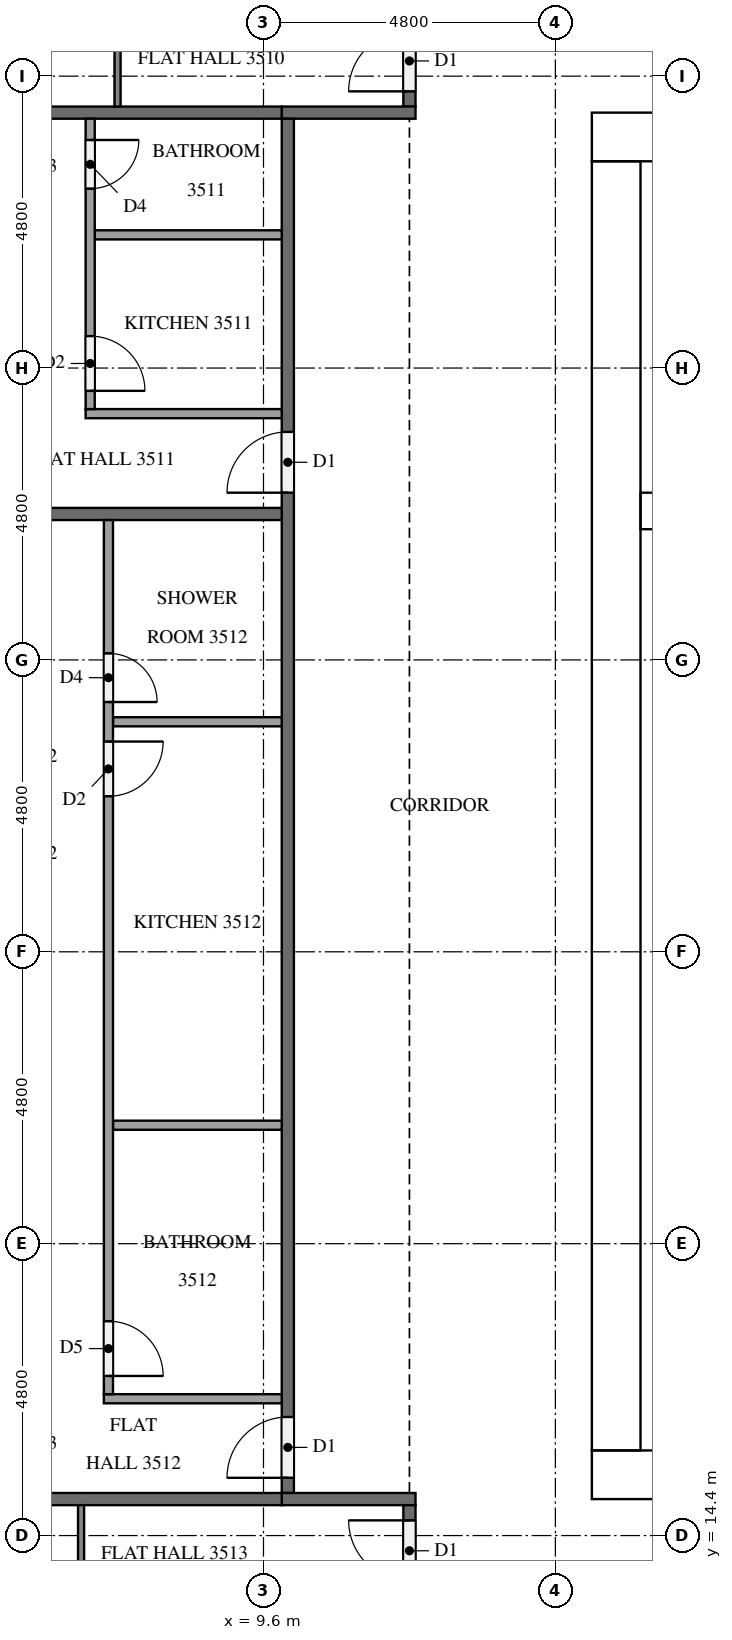
"""IFC4 building model, lengths in metres.
Left out: names, types, materials, properties, quantities, classifications, styles, units other than length and angle.
Written with IfcOpenShell. Run it as: python <this file> out.ifc"""

import sys

from ifc_helpers import new_model, si_unit, direction, frame, frame_2d, origin, place, context, subcontext, project, spatial, rectangle, extrude, element, fill, save


model = new_model("IFC4")
c1 = context("Model", 3, precision=1e-05, world=origin(), true_north=direction((0.0, 1.0)))
c2 = subcontext(c1, "Body", "Model", "MODEL_VIEW")
j1 = project(units=[si_unit("LENGTHUNIT", "METRE"), si_unit("PLANEANGLEUNIT", "RADIAN")], contexts=[c1])
p1 = place(None, origin())
s1 = spatial("IfcSite", under=j1, at=p1, CompositionType="ELEMENT")
p2 = place(p1, origin())
s2 = spatial("IfcBuilding", under=s1, at=p2, CompositionType="ELEMENT")
p3 = place(p2, frame((0.0, 0.0, 136.6)))
s3 = spatial("IfcBuildingStorey", under=s2, at=p3, CompositionType="ELEMENT", Elevation=136.6)
p4 = place(p3, frame((15.0, 15.4, 0.0), z_axis=(0.0, 0.0, 1.0), x_axis=(1.0, 0.0, 0.0)))
e1 = element("IfcWall", 1, at=p4, inside=s3, PredefinedType="SHEAR", context=c2, shape_type="SweptSolid", body=[
    extrude(rectangle(XDim=32.4, YDim=0.8, at=frame_2d((16.2, 0.0))), origin(), (0.0, 0.0, 1.0), 3.2),
])
p5 = place(p4, frame((15.3, 0.0, 0.0)))
e2 = element("IfcOpeningElement", 2, at=p5, cuts=e1, PredefinedType="OPENING", context=c2, shape_type="SweptSolid", body=[
    extrude(rectangle(XDim=1.8, YDim=2.1, at=frame_2d((0.9, 1.05))), frame((0.0, 0.41, 0.0), z_axis=(0.0, -1.0, 0.0), x_axis=(1.0, 0.0, 0.0)), (0.0, 0.0, 1.0), 0.82),
])
p6 = place(p3, frame((15.0, 37.4, 0.0), z_axis=(0.0, 0.0, 1.0), x_axis=(1.0, 0.0, 0.0)))
e3 = element("IfcWall", 3, at=p6, inside=s3, PredefinedType="SHEAR", context=c2, shape_type="SweptSolid", body=[
    extrude(rectangle(XDim=32.4, YDim=0.8, at=frame_2d((16.2, 0.0))), origin(), (0.0, 0.0, 1.0), 3.2),
])
p7 = place(p6, frame((15.3, 0.0, 0.0)))
e4 = element("IfcOpeningElement", 4, at=p7, cuts=e3, PredefinedType="OPENING", context=c2, shape_type="SweptSolid", body=[
    extrude(rectangle(XDim=1.8, YDim=2.1, at=frame_2d((0.9, 1.05))), frame((0.0, 0.41, 0.0), z_axis=(0.0, -1.0, 0.0), x_axis=(1.0, 0.0, 0.0)), (0.0, 0.0, 1.0), 0.82),
])
p8 = place(p6, frame((1.51, 0.0, 0.0)))
e5 = element("IfcOpeningElement", 5, at=p8, cuts=e3, PredefinedType="OPENING", context=c2, shape_type="SweptSolid", body=[
    extrude(rectangle(XDim=1.0, YDim=2.1, at=frame_2d((0.5, 1.05))), frame((0.0, 0.41, 0.0), z_axis=(0.0, -1.0, 0.0), x_axis=(1.0, 0.0, 0.0)), (0.0, 0.0, 1.0), 0.82),
])
p9 = place(p6, frame((5.11, 0.0, 0.0)))
e6 = element("IfcOpeningElement", 6, at=p9, cuts=e3, PredefinedType="OPENING", context=c2, shape_type="SweptSolid", body=[
    extrude(rectangle(XDim=1.0, YDim=2.1, at=frame_2d((0.5, 1.05))), frame((0.0, 0.41, 0.0), z_axis=(0.0, -1.0, 0.0), x_axis=(1.0, 0.0, 0.0)), (0.0, 0.0, 1.0), 0.82),
])
p10 = place(p3, frame((15.4, 15.8, 0.0), z_axis=(0.0, 0.0, 1.0), x_axis=(0.0, 1.0, 0.0)))
e7 = element("IfcWall", 7, at=p10, inside=s3, PredefinedType="SHEAR", context=c2, shape_type="SweptSolid", body=[
    extrude(rectangle(XDim=21.2, YDim=0.8, at=frame_2d((10.6, 0.0))), origin(), (0.0, 0.0, 1.0), 3.2),
])
p11 = place(p10, frame((4.96, 0.0, 0.0)))
e8 = element("IfcOpeningElement", 8, at=p11, cuts=e7, PredefinedType="OPENING", context=c2, shape_type="SweptSolid", body=[
    extrude(rectangle(XDim=1.2, YDim=2.1, at=frame_2d((0.6, 1.05))), frame((0.0, 0.41, 0.0), z_axis=(0.0, -1.0, 0.0), x_axis=(1.0, 0.0, 0.0)), (0.0, 0.0, 1.0), 0.82),
])
p12 = place(p3, frame((15.8, 31.25, 0.0), z_axis=(0.0, 0.0, 1.0), x_axis=(1.0, 0.0, 0.0)))
e9 = element("IfcWall", 9, at=p12, inside=s3, PredefinedType="SHEAR", context=c2, shape_type="SweptSolid", body=[
    extrude(rectangle(XDim=7.0, YDim=0.6, at=frame_2d((3.5, 0.0))), origin(), (0.0, 0.0, 1.0), 3.2),
])
p13 = place(p3, frame((12.0, 37.9, 0.0), z_axis=(0.0, 0.0, 1.0), x_axis=(0.0, 1.0, 0.0)))
e10 = element("IfcWall", 10, at=p13, inside=s3, PredefinedType="PARTITIONING", context=c2, shape_type="SweptSolid", body=[
    extrude(rectangle(XDim=2.8, YDim=0.2, at=frame_2d((1.4, 0.0))), origin(), (0.0, 0.0, 1.0), 3.2),
])
p14 = place(p13, frame((0.25, 0.0, 0.0)))
e11 = element("IfcOpeningElement", 11, at=p14, cuts=e10, PredefinedType="OPENING", context=c2, shape_type="SweptSolid", body=[
    extrude(rectangle(XDim=1.0, YDim=2.1, at=frame_2d((0.5, 1.05))), frame((0.0, 0.11, 0.0), z_axis=(0.0, -1.0, 0.0), x_axis=(1.0, 0.0, 0.0)), (0.0, 0.0, 1.0), 0.22),
])
p15 = place(p3, frame((12.1, 37.8, 0.0), z_axis=(0.0, 0.0, 1.0), x_axis=(-1.0, 0.0, 0.0)))
e12 = element("IfcWall", 12, at=p15, inside=s3, PredefinedType="PARTITIONING", context=c2, shape_type="SweptSolid", body=[
    extrude(rectangle(XDim=2.2, YDim=0.2, at=frame_2d((1.1, 0.0))), origin(), (0.0, 0.0, 1.0), 3.2),
])
p16 = place(p3, frame((10.0, 15.1, 0.0), z_axis=(0.0, 0.0, 1.0), x_axis=(0.0, 1.0, 0.0)))
e13 = element("IfcWall", 13, at=p16, inside=s3, PredefinedType="PARTITIONING", context=c2, shape_type="SweptSolid", body=[
    extrude(rectangle(XDim=22.6, YDim=0.2, at=frame_2d((11.3, 0.0))), origin(), (0.0, 0.0, 1.0), 3.2),
])
p17 = place(p16, frame((16.45, 0.0, 0.0)))
e14 = element("IfcOpeningElement", 14, at=p17, cuts=e13, PredefinedType="OPENING", context=c2, shape_type="SweptSolid", body=[
    extrude(rectangle(XDim=1.0, YDim=2.1, at=frame_2d((0.5, 1.05))), frame((0.0, 0.11, 0.0), z_axis=(0.0, -1.0, 0.0), x_axis=(1.0, 0.0, 0.0)), (0.0, 0.0, 1.0), 0.22),
])
p18 = place(p16, frame((0.25, 0.0, 0.0)))
e15 = element("IfcOpeningElement", 15, at=p18, cuts=e13, PredefinedType="OPENING", context=c2, shape_type="SweptSolid", body=[
    extrude(rectangle(XDim=1.0, YDim=2.1, at=frame_2d((0.5, 1.05))), frame((0.0, 0.11, 0.0), z_axis=(0.0, -1.0, 0.0), x_axis=(1.0, 0.0, 0.0)), (0.0, 0.0, 1.0), 0.22),
])
p19 = place(p3, frame((9.9, 15.0, 0.0), z_axis=(0.0, 0.0, 1.0), x_axis=(1.0, 0.0, 0.0)))
e16 = element("IfcWall", 16, at=p19, inside=s3, PredefinedType="PARTITIONING", context=c2, shape_type="SweptSolid", body=[
    extrude(rectangle(XDim=2.2, YDim=0.2, at=frame_2d((1.1, 0.0))), origin(), (0.0, 0.0, 1.0), 3.2),
])
p20 = place(p3, frame((12.0, 12.1, 0.0), z_axis=(0.0, 0.0, 1.0), x_axis=(0.0, 1.0, 0.0)))
e17 = element("IfcWall", 17, at=p20, inside=s3, PredefinedType="PARTITIONING", context=c2, shape_type="SweptSolid", body=[
    extrude(rectangle(XDim=2.8, YDim=0.2, at=frame_2d((1.4, 0.0))), origin(), (0.0, 0.0, 1.0), 3.2),
])
p21 = place(p20, frame((1.55, 0.0, 0.0)))
e18 = element("IfcOpeningElement", 18, at=p21, cuts=e17, PredefinedType="OPENING", context=c2, shape_type="SweptSolid", body=[
    extrude(rectangle(XDim=1.0, YDim=2.1, at=frame_2d((0.5, 1.05))), frame((0.0, 0.11, 0.0), z_axis=(0.0, -1.0, 0.0), x_axis=(1.0, 0.0, 0.0)), (0.0, 0.0, 1.0), 0.22),
])
p22 = place(p3, frame((0.375, 37.8, 0.0), z_axis=(0.0, 0.0, 1.0), x_axis=(1.0, 0.0, 0.0)))
e19 = element("IfcWall", 19, at=p22, inside=s3, PredefinedType="PARTITIONING", context=c2, shape_type="SweptSolid", body=[
    extrude(rectangle(XDim=9.525, YDim=0.2, at=frame_2d((4.762, 0.0))), origin(), (0.0, 0.0, 1.0), 3.2),
])
for number, where, z_axis, x_axis in (
    (20, (0.1, 31.2, 0.0), (0.0, 0.0, 1.0), (1.0, 0.0, 0.0)),
    (21, (0.1, 15.0, 0.0), (0.0, 0.0, 1.0), (1.0, 0.0, 0.0)),
):
    element("IfcWall", number, at=place(p3, frame(where, z_axis=z_axis, x_axis=x_axis)), inside=s3, PredefinedType="PARTITIONING", context=c2, shape_type="SweptSolid", body=[
        extrude(rectangle(XDim=9.8, YDim=0.2, at=frame_2d((4.9, 0.0))), origin(), (0.0, 0.0, 1.0), 3.2),
    ])
p23 = place(p3, frame((7.2, 37.9, 0.0), z_axis=(0.0, 0.0, 1.0), x_axis=(0.0, 1.0, 0.0)))
e22 = element("IfcWall", 22, at=p23, inside=s3, PredefinedType="PARTITIONING", context=c2, shape_type="SweptSolid", body=[
    extrude(rectangle(XDim=14.8, YDim=0.1, at=frame_2d((7.4, 0.0))), origin(), (0.0, 0.0, 1.0), 3.2),
])
p24 = place(p23, frame((4.05, 0.0, 0.0)))
e23 = element("IfcOpeningElement", 23, at=p24, cuts=e22, PredefinedType="OPENING", context=c2, shape_type="SweptSolid", body=[
    extrude(rectangle(XDim=0.9, YDim=2.1, at=frame_2d((0.45, 1.05))), frame((0.0, 0.06, 0.0), z_axis=(0.0, -1.0, 0.0), x_axis=(1.0, 0.0, 0.0)), (0.0, 0.0, 1.0), 0.12),
])
p25 = place(p23, frame((5.65, 0.0, 0.0)))
e24 = element("IfcOpeningElement", 24, at=p25, cuts=e22, PredefinedType="OPENING", context=c2, shape_type="SweptSolid", body=[
    extrude(rectangle(XDim=0.9, YDim=2.1, at=frame_2d((0.45, 1.05))), frame((0.0, 0.06, 0.0), z_axis=(0.0, -1.0, 0.0), x_axis=(1.0, 0.0, 0.0)), (0.0, 0.0, 1.0), 0.12),
])
p26 = place(p23, frame((13.5, 0.0, 0.0)))
e25 = element("IfcOpeningElement", 25, at=p26, cuts=e22, PredefinedType="OPENING", context=c2, shape_type="SweptSolid", body=[
    extrude(rectangle(XDim=1.0, YDim=2.1, at=frame_2d((0.5, 1.05))), frame((0.0, 0.06, 0.0), z_axis=(0.0, -1.0, 0.0), x_axis=(1.0, 0.0, 0.0)), (0.0, 0.0, 1.0), 0.12),
])
p27 = place(p3, frame((9.9, 35.79, 0.0), z_axis=(0.0, 0.0, 1.0), x_axis=(-1.0, 0.0, 0.0)))
e26 = element("IfcWall", 26, at=p27, inside=s3, PredefinedType="PARTITIONING", context=c2, shape_type="SweptSolid", body=[
    extrude(rectangle(XDim=3.075, YDim=0.15, at=frame_2d((1.538, 0.0))), origin(), (0.0, 0.0, 1.0), 3.2),
])
p28 = place(p3, frame((9.9, 32.85, 0.0), z_axis=(0.0, 0.0, 1.0), x_axis=(-1.0, 0.0, 0.0)))
e27 = element("IfcWall", 27, at=p28, inside=s3, PredefinedType="PARTITIONING", context=c2, shape_type="SweptSolid", body=[
    extrude(rectangle(XDim=3.225, YDim=0.15, at=frame_2d((1.612, 0.0))), origin(), (0.0, 0.0, 1.0), 3.2),
])
p29 = place(p3, frame((6.75, 37.7, 0.0), z_axis=(0.0, 0.0, 1.0), x_axis=(0.0, -1.0, 0.0)))
e28 = element("IfcWall", 28, at=p29, inside=s3, PredefinedType="PARTITIONING", context=c2, shape_type="SweptSolid", body=[
    extrude(rectangle(XDim=4.775, YDim=0.15, at=frame_2d((2.387, 0.0))), origin(), (0.0, 0.0, 1.0), 3.2),
])
p30 = place(p29, frame((3.575, 0.0, 0.0)))
e29 = element("IfcOpeningElement", 29, at=p30, cuts=e28, PredefinedType="OPENING", context=c2, shape_type="SweptSolid", body=[
    extrude(rectangle(XDim=0.9, YDim=2.1, at=frame_2d((0.45, 1.05))), frame((0.0, 0.085, 0.0), z_axis=(0.0, -1.0, 0.0), x_axis=(1.0, 0.0, 0.0)), (0.0, 0.0, 1.0), 0.17),
])
p31 = place(p29, frame((0.35, 0.0, 0.0)))
e30 = element("IfcOpeningElement", 30, at=p31, cuts=e28, PredefinedType="OPENING", context=c2, shape_type="SweptSolid", body=[
    extrude(rectangle(XDim=0.8, YDim=2.1, at=frame_2d((0.4, 1.05))), frame((0.0, 0.085, 0.0), z_axis=(0.0, -1.0, 0.0), x_axis=(1.0, 0.0, 0.0)), (0.0, 0.0, 1.0), 0.17),
])
for number, where, z_axis, x_axis in (
    (31, (9.9, 21.148, 0.0), (0.0, 0.0, 1.0), (-1.0, 0.0, 0.0)),
    (32, (9.9, 27.783, 0.0), (0.0, 0.0, 1.0), (-1.0, 0.0, 0.0)),
):
    element("IfcWall", number, at=place(p3, frame(where, z_axis=z_axis, x_axis=x_axis)), inside=s3, PredefinedType="PARTITIONING", context=c2, shape_type="SweptSolid", body=[
        extrude(rectangle(XDim=2.775, YDim=0.15, at=frame_2d((1.387, 0.0))), origin(), (0.0, 0.0, 1.0), 3.2),
    ])
p32 = place(p3, frame((9.9, 16.65, 0.0), z_axis=(0.0, 0.0, 1.0), x_axis=(-1.0, 0.0, 0.0)))
e33 = element("IfcWall", 33, at=p32, inside=s3, PredefinedType="PARTITIONING", context=c2, shape_type="SweptSolid", body=[
    extrude(rectangle(XDim=2.925, YDim=0.15, at=frame_2d((1.462, 0.0))), origin(), (0.0, 0.0, 1.0), 3.2),
])
p33 = place(p3, frame((7.05, 31.1, 0.0), z_axis=(0.0, 0.0, 1.0), x_axis=(0.0, -1.0, 0.0)))
e34 = element("IfcWall", 34, at=p33, inside=s3, PredefinedType="PARTITIONING", context=c2, shape_type="SweptSolid", body=[
    extrude(rectangle(XDim=14.375, YDim=0.15, at=frame_2d((7.188, 0.0))), origin(), (0.0, 0.0, 1.0), 3.2),
])
p34 = place(p33, frame((13.175, 0.0, 0.0)))
e35 = element("IfcOpeningElement", 35, at=p34, cuts=e34, PredefinedType="OPENING", context=c2, shape_type="SweptSolid", body=[
    extrude(rectangle(XDim=0.9, YDim=2.1, at=frame_2d((0.45, 1.05))), frame((0.0, 0.085, 0.0), z_axis=(0.0, -1.0, 0.0), x_axis=(1.0, 0.0, 0.0)), (0.0, 0.0, 1.0), 0.17),
])
p35 = place(p33, frame((3.642, 0.0, 0.0)))
e36 = element("IfcOpeningElement", 36, at=p35, cuts=e34, PredefinedType="OPENING", context=c2, shape_type="SweptSolid", body=[
    extrude(rectangle(XDim=0.9, YDim=2.1, at=frame_2d((0.45, 1.05))), frame((0.0, 0.085, 0.0), z_axis=(0.0, -1.0, 0.0), x_axis=(1.0, 0.0, 0.0)), (0.0, 0.0, 1.0), 0.17),
])
p36 = place(p33, frame((2.192, 0.0, 0.0)))
e37 = element("IfcOpeningElement", 37, at=p36, cuts=e34, PredefinedType="OPENING", context=c2, shape_type="SweptSolid", body=[
    extrude(rectangle(XDim=0.8, YDim=2.1, at=frame_2d((0.4, 1.05))), frame((0.0, 0.085, 0.0), z_axis=(0.0, -1.0, 0.0), x_axis=(1.0, 0.0, 0.0)), (0.0, 0.0, 1.0), 0.17),
])
p37 = place(p3, frame((6.6, 4.9, 0.0), z_axis=(0.0, 0.0, 1.0), x_axis=(0.0, 1.0, 0.0)))
e38 = element("IfcWall", 38, at=p37, inside=s3, PredefinedType="PARTITIONING", context=c2, shape_type="SweptSolid", body=[
    extrude(rectangle(XDim=10.0, YDim=0.1, at=frame_2d((5.0, 0.0))), origin(), (0.0, 0.0, 1.0), 3.2),
])
p38 = place(p37, frame((5.05, 0.0, 0.0)))
e39 = element("IfcOpeningElement", 39, at=p38, cuts=e38, PredefinedType="OPENING", context=c2, shape_type="SweptSolid", body=[
    extrude(rectangle(XDim=1.0, YDim=2.1, at=frame_2d((0.5, 1.05))), frame((0.0, 0.06, 0.0), z_axis=(0.0, -1.0, 0.0), x_axis=(1.0, 0.0, 0.0)), (0.0, 0.0, 1.0), 0.12),
])
p39 = place(p37, frame((3.45, 0.0, 0.0)))
e40 = element("IfcOpeningElement", 40, at=p39, cuts=e38, PredefinedType="OPENING", context=c2, shape_type="SweptSolid", body=[
    extrude(rectangle(XDim=0.9, YDim=2.1, at=frame_2d((0.45, 1.05))), frame((0.0, 0.06, 0.0), z_axis=(0.0, -1.0, 0.0), x_axis=(1.0, 0.0, 0.0)), (0.0, 0.0, 1.0), 0.12),
])
p40 = place(p11, frame((1.2, 0.0, 0.0), z_axis=(0.0, 0.0, 1.0), x_axis=(-1.0, 0.0, 0.0)))
e41 = element("IfcDoor", 41, at=p40, inside=s3, OperationType="SINGLE_SWING_RIGHT", PredefinedType="DOOR", context=c2, shape_type="SweptSolid", body=[
    extrude(rectangle(XDim=1.2, YDim=2.1, at=frame_2d((0.6, 1.05))), frame((0.0, 0.025, 0.0), z_axis=(0.0, -1.0, 0.0), x_axis=(1.0, 0.0, 0.0)), (0.0, 0.0, 1.0), 0.05),
])
fill(e8, e41)
p41 = place(p14, origin())
e42 = element("IfcDoor", 42, at=p41, inside=s3, OperationType="SINGLE_SWING_LEFT", PredefinedType="DOOR", context=c2, shape_type="SweptSolid", body=[
    extrude(rectangle(XDim=1.0, YDim=2.1, at=frame_2d((0.5, 1.05))), frame((0.0, 0.025, 0.0), z_axis=(0.0, -1.0, 0.0), x_axis=(1.0, 0.0, 0.0)), (0.0, 0.0, 1.0), 0.05),
])
fill(e11, e42)
p42 = place(p17, origin())
e43 = element("IfcDoor", 43, at=p42, inside=s3, OperationType="SINGLE_SWING_LEFT", PredefinedType="DOOR", context=c2, shape_type="SweptSolid", body=[
    extrude(rectangle(XDim=1.0, YDim=2.1, at=frame_2d((0.5, 1.05))), frame((0.0, 0.025, 0.0), z_axis=(0.0, -1.0, 0.0), x_axis=(1.0, 0.0, 0.0)), (0.0, 0.0, 1.0), 0.05),
])
fill(e14, e43)
p43 = place(p18, origin())
e44 = element("IfcDoor", 44, at=p43, inside=s3, OperationType="SINGLE_SWING_LEFT", PredefinedType="DOOR", context=c2, shape_type="SweptSolid", body=[
    extrude(rectangle(XDim=1.0, YDim=2.1, at=frame_2d((0.5, 1.05))), frame((0.0, 0.025, 0.0), z_axis=(0.0, -1.0, 0.0), x_axis=(1.0, 0.0, 0.0)), (0.0, 0.0, 1.0), 0.05),
])
fill(e15, e44)
p44 = place(p21, origin())
e45 = element("IfcDoor", 45, at=p44, inside=s3, OperationType="SINGLE_SWING_RIGHT", PredefinedType="DOOR", context=c2, shape_type="SweptSolid", body=[
    extrude(rectangle(XDim=1.0, YDim=2.1, at=frame_2d((0.5, 1.05))), frame((0.0, 0.025, 0.0), z_axis=(0.0, -1.0, 0.0), x_axis=(1.0, 0.0, 0.0)), (0.0, 0.0, 1.0), 0.05),
])
fill(e18, e45)
p45 = place(p30, origin())
e46 = element("IfcDoor", 46, at=p45, inside=s3, OperationType="SINGLE_SWING_RIGHT", PredefinedType="DOOR", context=c2, shape_type="SweptSolid", body=[
    extrude(rectangle(XDim=0.9, YDim=2.1, at=frame_2d((0.45, 1.05))), frame((0.0, 0.025, 0.0), z_axis=(0.0, -1.0, 0.0), x_axis=(1.0, 0.0, 0.0)), (0.0, 0.0, 1.0), 0.05),
])
fill(e29, e46)
p46 = place(p31, origin())
e47 = element("IfcDoor", 47, at=p46, inside=s3, OperationType="SINGLE_SWING_LEFT", PredefinedType="DOOR", context=c2, shape_type="SweptSolid", body=[
    extrude(rectangle(XDim=0.8, YDim=2.1, at=frame_2d((0.4, 1.05))), frame((0.0, 0.025, 0.0), z_axis=(0.0, -1.0, 0.0), x_axis=(1.0, 0.0, 0.0)), (0.0, 0.0, 1.0), 0.05),
])
fill(e30, e47)
p47 = place(p34, origin())
e48 = element("IfcDoor", 48, at=p47, inside=s3, OperationType="SINGLE_SWING_RIGHT", PredefinedType="DOOR", context=c2, shape_type="SweptSolid", body=[
    extrude(rectangle(XDim=0.9, YDim=2.1, at=frame_2d((0.45, 1.05))), frame((0.0, 0.025, 0.0), z_axis=(0.0, -1.0, 0.0), x_axis=(1.0, 0.0, 0.0)), (0.0, 0.0, 1.0), 0.05),
])
fill(e35, e48)
p48 = place(p35, origin())
e49 = element("IfcDoor", 49, at=p48, inside=s3, OperationType="SINGLE_SWING_LEFT", PredefinedType="DOOR", context=c2, shape_type="SweptSolid", body=[
    extrude(rectangle(XDim=0.9, YDim=2.1, at=frame_2d((0.45, 1.05))), frame((0.0, 0.025, 0.0), z_axis=(0.0, -1.0, 0.0), x_axis=(1.0, 0.0, 0.0)), (0.0, 0.0, 1.0), 0.05),
])
fill(e36, e49)
p49 = place(p36, origin())
e50 = element("IfcDoor", 50, at=p49, inside=s3, OperationType="SINGLE_SWING_RIGHT", PredefinedType="DOOR", context=c2, shape_type="SweptSolid", body=[
    extrude(rectangle(XDim=0.8, YDim=2.1, at=frame_2d((0.4, 1.05))), frame((0.0, 0.025, 0.0), z_axis=(0.0, -1.0, 0.0), x_axis=(1.0, 0.0, 0.0)), (0.0, 0.0, 1.0), 0.05),
])
fill(e37, e50)
save(model, sys.argv[1])
